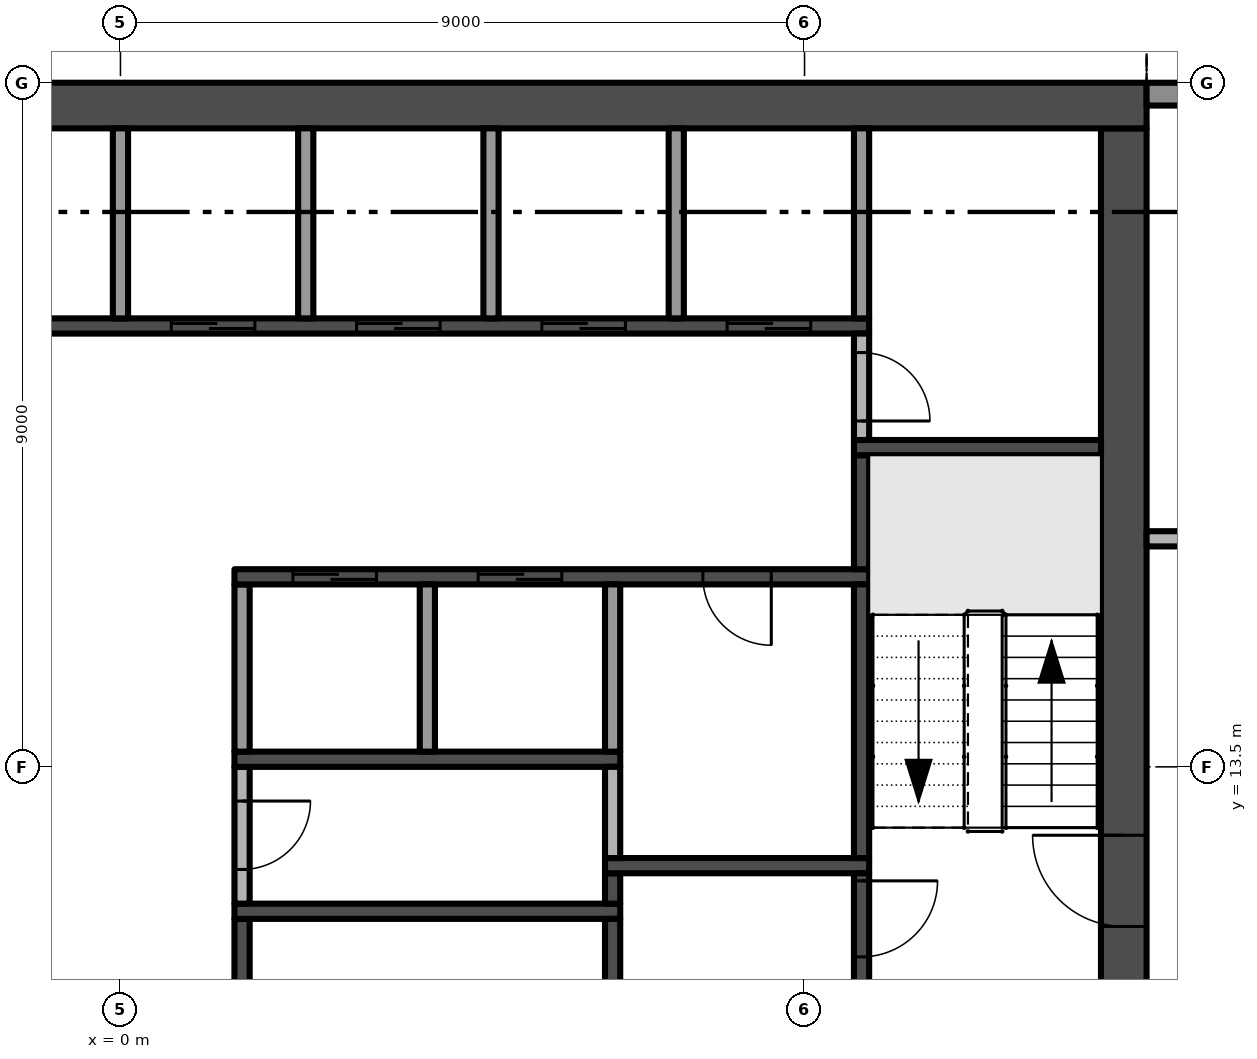
"""IFC4 building model, lengths in metres.
Left out: names, types, materials, properties, quantities, classifications, styles, units other than length and angle.
Written with IfcOpenShell. Run it as: python <this file> out.ifc"""

import sys

from ifc_helpers import new_model, si_unit, direction, frame, frame_2d, origin, place, context, subcontext, project, spatial, polyline, rectangle, outline, extrude, element, fill, save


model = new_model("IFC4")
c1 = context("Model", 3, precision=1e-05, world=origin(), true_north=direction((0.0, 1.0)))
c2 = subcontext(c1, "Body", "Model", "MODEL_VIEW")
j1 = project(units=[si_unit("LENGTHUNIT", "METRE"), si_unit("PLANEANGLEUNIT", "RADIAN")], contexts=[c1])
p1 = place(None, origin())
s1 = spatial("IfcSite", under=j1, at=p1, CompositionType="ELEMENT")
p2 = place(p1, origin())
s2 = spatial("IfcBuilding", under=s1, at=p2, CompositionType="ELEMENT")
p3 = place(p2, frame((0.0, 0.0, 195.8)))
s3 = spatial("IfcBuildingStorey", under=s2, at=p3, CompositionType="ELEMENT", Elevation=195.8)
p4 = place(p3, frame((13.2, 5.1, -0.3), z_axis=(0.0, 0.0, 1.0), x_axis=(0.0, 1.0, 0.0)))
e1 = element("IfcWall", 1, at=p4, inside=s3, PredefinedType="SHEAR", context=c2, shape_type="SweptSolid", body=[
    extrude(rectangle(XDim=16.8, YDim=0.6, at=frame_2d((8.4, 0.0))), origin(), (0.0, 0.0, 1.0), 3.8),
])
p5 = place(p4, frame((6.3, 0.0, 0.3)))
e2 = element("IfcOpeningElement", 2, at=p5, cuts=e1, PredefinedType="OPENING", context=c2, shape_type="SweptSolid", body=[
    extrude(rectangle(XDim=1.2, YDim=2.2, at=frame_2d((0.6, 1.1))), frame((0.0, 0.31, 0.0), z_axis=(0.0, -1.0, 0.0), x_axis=(1.0, 0.0, 0.0)), (0.0, 0.0, 1.0), 0.62),
])
p6 = place(p3, frame((13.5, 22.2, -0.3), z_axis=(0.0, 0.0, 1.0), x_axis=(-1.0, 0.0, 0.0)))
e3 = element("IfcWall", 3, at=p6, inside=s3, PredefinedType="SHEAR", context=c2, shape_type="SweptSolid", body=[
    extrude(rectangle(XDim=27.0, YDim=0.6, at=frame_2d((13.5, 0.0))), origin(), (0.0, 0.0, 1.0), 3.8),
])
p7 = place(p3, frame((13.5, 22.35, 0.0), z_axis=(0.0, 0.0, 1.0), x_axis=(1.0, 0.0, 0.0)))
e4 = element("IfcWall", 4, at=p7, inside=s3, PredefinedType="SOLIDWALL", context=c2, shape_type="SweptSolid", body=[
    extrude(rectangle(XDim=3.975, YDim=0.3, at=frame_2d((1.988, 0.0))), origin(), (0.0, 0.0, 1.0), 3.5),
])
p8 = place(p7, frame((0.625, 0.0, 0.0)))
e5 = element("IfcOpeningElement", 5, at=p8, cuts=e4, PredefinedType="OPENING", context=c2, shape_type="SweptSolid", body=[
    extrude(rectangle(XDim=2.4, YDim=2.4, at=frame_2d((1.2, 1.2))), frame((0.0, 0.16, 0.0), z_axis=(0.0, -1.0, 0.0), x_axis=(1.0, 0.0, 0.0)), (0.0, 0.0, 1.0), 0.32),
])
p9 = place(p3, origin())
e6 = element("IfcWall", 6, at=p9, inside=s3, PredefinedType="USERDEFINED", context=c2, shape_type="SweptSolid", body=[
    extrude(outline(polyline([(22.5, 24.3), (21.0, 23.595), (19.5, 23.159), (18.75, 23.1), (18.0, 23.159), (16.5, 23.595), (15.0, 24.3), (13.5, 25.005), (13.394, 24.779), (14.894, 24.074), (16.411, 23.36), (17.955, 22.911), (18.75, 22.849), (19.545, 22.911), (21.089, 23.36), (22.606, 24.074), (22.5, 24.3)])), origin(), (0.0, 0.0, 1.0), 0.9),
])
p10 = place(p3, frame((-9.85, 19.3, 0.0), z_axis=(0.0, 0.0, 1.0), x_axis=(1.0, 0.0, 0.0)))
e7 = element("IfcWall", 7, at=p10, inside=s3, PredefinedType="SHEAR", context=c2, shape_type="SweptSolid", body=[
    extrude(rectangle(XDim=19.7, YDim=0.2, at=frame_2d((9.85, 0.0))), origin(), (0.0, 0.0, 1.0), 3.5),
])
p11 = place(p10, frame((10.519, 0.0, 0.0)))
e8 = element("IfcOpeningElement", 8, at=p11, cuts=e7, PredefinedType="OPENING", context=c2, shape_type="SweptSolid", body=[
    extrude(rectangle(XDim=1.1, YDim=2.1, at=frame_2d((0.55, 1.05))), frame((0.0, 0.11, 0.0), z_axis=(0.0, -1.0, 0.0), x_axis=(1.0, 0.0, 0.0)), (0.0, 0.0, 1.0), 0.22),
])
p12 = place(p10, frame((12.956, 0.0, 0.0)))
e9 = element("IfcOpeningElement", 9, at=p12, cuts=e7, PredefinedType="OPENING", context=c2, shape_type="SweptSolid", body=[
    extrude(rectangle(XDim=1.1, YDim=2.1, at=frame_2d((0.55, 1.05))), frame((0.0, 0.11, 0.0), z_axis=(0.0, -1.0, 0.0), x_axis=(1.0, 0.0, 0.0)), (0.0, 0.0, 1.0), 0.22),
])
p13 = place(p10, frame((15.394, 0.0, 0.0)))
e10 = element("IfcOpeningElement", 10, at=p13, cuts=e7, PredefinedType="OPENING", context=c2, shape_type="SweptSolid", body=[
    extrude(rectangle(XDim=1.1, YDim=2.1, at=frame_2d((0.55, 1.05))), frame((0.0, 0.11, 0.0), z_axis=(0.0, -1.0, 0.0), x_axis=(1.0, 0.0, 0.0)), (0.0, 0.0, 1.0), 0.22),
])
p14 = place(p10, frame((17.831, 0.0, 0.0)))
e11 = element("IfcOpeningElement", 11, at=p14, cuts=e7, PredefinedType="OPENING", context=c2, shape_type="SweptSolid", body=[
    extrude(rectangle(XDim=1.1, YDim=2.1, at=frame_2d((0.55, 1.05))), frame((0.0, 0.11, 0.0), z_axis=(0.0, -1.0, 0.0), x_axis=(1.0, 0.0, 0.0)), (0.0, 0.0, 1.0), 0.22),
])
p15 = place(p10, frame((2.087, 0.0, 0.0)))
e12 = element("IfcOpeningElement", 12, at=p15, cuts=e7, PredefinedType="OPENING", context=c2, shape_type="SweptSolid", body=[
    extrude(rectangle(XDim=0.9, YDim=2.1, at=frame_2d((0.45, 1.05))), frame((0.0, 0.11, 0.0), z_axis=(0.0, -1.0, 0.0), x_axis=(1.0, 0.0, 0.0)), (0.0, 0.0, 1.0), 0.22),
])
p16 = place(p10, frame((6.963, 0.0, 0.0)))
e13 = element("IfcOpeningElement", 13, at=p16, cuts=e7, PredefinedType="OPENING", context=c2, shape_type="SweptSolid", body=[
    extrude(rectangle(XDim=0.9, YDim=2.1, at=frame_2d((0.45, 1.05))), frame((0.0, 0.11, 0.0), z_axis=(0.0, -1.0, 0.0), x_axis=(1.0, 0.0, 0.0)), (0.0, 0.0, 1.0), 0.22),
])
p17 = place(p3, frame((0.0, 19.4, 0.0), z_axis=(0.0, 0.0, 1.0), x_axis=(0.0, 1.0, 0.0)))
e14 = element("IfcWall", 14, at=p17, inside=s3, PredefinedType="PARTITIONING", context=c2, shape_type="SweptSolid", body=[
    extrude(rectangle(XDim=2.5, YDim=0.2, at=frame_2d((1.25, 0.0))), origin(), (0.0, 0.0, 1.0), 3.5),
])
p18 = place(p3, frame((1.6, 11.5, 0.0), z_axis=(0.0, 0.0, 1.0), x_axis=(0.0, -1.0, 0.0)))
e15 = element("IfcWall", 15, at=p18, inside=s3, PredefinedType="SHEAR", context=c2, shape_type="SweptSolid", body=[
    extrude(rectangle(XDim=6.4, YDim=0.2, at=frame_2d((3.2, 0.0))), origin(), (0.0, 0.0, 1.0), 3.5),
])
p19 = place(p18, frame((2.35, 0.0, 0.0)))
e16 = element("IfcOpeningElement", 16, at=p19, cuts=e15, PredefinedType="OPENING", context=c2, shape_type="SweptSolid", body=[
    extrude(rectangle(XDim=0.9, YDim=2.1, at=frame_2d((0.45, 1.05))), frame((0.0, 0.11, 0.0), z_axis=(0.0, -1.0, 0.0), x_axis=(1.0, 0.0, 0.0)), (0.0, 0.0, 1.0), 0.22),
])
p20 = place(p3, frame((1.5, 11.6, 0.0), z_axis=(0.0, 0.0, 1.0), x_axis=(1.0, 0.0, 0.0)))
e17 = element("IfcWall", 17, at=p20, inside=s3, PredefinedType="SHEAR", context=c2, shape_type="SweptSolid", body=[
    extrude(rectangle(XDim=5.075, YDim=0.2, at=frame_2d((2.538, 0.0))), origin(), (0.0, 0.0, 1.0), 3.5),
])
p21 = place(p3, frame((1.6, 13.5, 0.0), z_axis=(0.0, 0.0, 1.0), x_axis=(0.0, -1.0, 0.0)))
e18 = element("IfcWall", 18, at=p21, inside=s3, PredefinedType="PARTITIONING", context=c2, shape_type="SweptSolid", body=[
    extrude(rectangle(XDim=1.8, YDim=0.2, at=frame_2d((0.9, 0.0))), origin(), (0.0, 0.0, 1.0), 3.5),
])
p22 = place(p21, frame((0.45, 0.0, 0.0)))
e19 = element("IfcOpeningElement", 19, at=p22, cuts=e18, PredefinedType="OPENING", context=c2, shape_type="SweptSolid", body=[
    extrude(rectangle(XDim=0.9, YDim=2.1, at=frame_2d((0.45, 1.05))), frame((0.0, 0.11, 0.0), z_axis=(0.0, -1.0, 0.0), x_axis=(1.0, 0.0, 0.0)), (0.0, 0.0, 1.0), 0.22),
])
p23 = place(p3, frame((1.5, 13.6, 0.0), z_axis=(0.0, 0.0, 1.0), x_axis=(1.0, 0.0, 0.0)))
e20 = element("IfcWall", 20, at=p23, inside=s3, PredefinedType="SHEAR", context=c2, shape_type="SweptSolid", body=[
    extrude(rectangle(XDim=5.075, YDim=0.2, at=frame_2d((2.538, 0.0))), origin(), (0.0, 0.0, 1.0), 3.5),
])
p24 = place(p3, frame((1.6, 13.7, 0.0), z_axis=(0.0, 0.0, 1.0), x_axis=(0.0, 1.0, 0.0)))
e21 = element("IfcWall", 21, at=p24, inside=s3, PredefinedType="PARTITIONING", context=c2, shape_type="SweptSolid", body=[
    extrude(rectangle(XDim=2.2, YDim=0.2, at=frame_2d((1.1, 0.0))), origin(), (0.0, 0.0, 1.0), 3.5),
])
p25 = place(p3, frame((9.85, 16.0, 0.0), z_axis=(0.0, 0.0, 1.0), x_axis=(-1.0, 0.0, 0.0)))
e22 = element("IfcWall", 22, at=p25, inside=s3, PredefinedType="SHEAR", context=c2, shape_type="SweptSolid", body=[
    extrude(rectangle(XDim=8.35, YDim=0.2, at=frame_2d((4.175, 0.0))), origin(), (0.0, 0.0, 1.0), 3.5),
])
p26 = place(p25, frame((6.481, 0.0, 0.0)))
e23 = element("IfcOpeningElement", 23, at=p26, cuts=e22, PredefinedType="OPENING", context=c2, shape_type="SweptSolid", body=[
    extrude(rectangle(XDim=1.1, YDim=2.1, at=frame_2d((0.55, 1.05))), frame((0.0, 0.11, 0.0), z_axis=(0.0, -1.0, 0.0), x_axis=(1.0, 0.0, 0.0)), (0.0, 0.0, 1.0), 0.22),
])
p27 = place(p25, frame((4.044, 0.0, 0.0)))
e24 = element("IfcOpeningElement", 24, at=p27, cuts=e22, PredefinedType="OPENING", context=c2, shape_type="SweptSolid", body=[
    extrude(rectangle(XDim=1.1, YDim=2.1, at=frame_2d((0.55, 1.05))), frame((0.0, 0.11, 0.0), z_axis=(0.0, -1.0, 0.0), x_axis=(1.0, 0.0, 0.0)), (0.0, 0.0, 1.0), 0.22),
])
p28 = place(p25, frame((1.288, 0.0, 0.0)))
e25 = element("IfcOpeningElement", 25, at=p28, cuts=e22, PredefinedType="OPENING", context=c2, shape_type="SweptSolid", body=[
    extrude(rectangle(XDim=0.9, YDim=2.1, at=frame_2d((0.45, 1.05))), frame((0.0, 0.11, 0.0), z_axis=(0.0, -1.0, 0.0), x_axis=(1.0, 0.0, 0.0)), (0.0, 0.0, 1.0), 0.22),
])
p29 = place(p3, frame((2.438, 19.4, 0.0), z_axis=(0.0, 0.0, 1.0), x_axis=(0.0, 1.0, 0.0)))
e26 = element("IfcWall", 26, at=p29, inside=s3, PredefinedType="PARTITIONING", context=c2, shape_type="SweptSolid", body=[
    extrude(rectangle(XDim=2.5, YDim=0.2, at=frame_2d((1.25, 0.0))), origin(), (0.0, 0.0, 1.0), 3.5),
])
p30 = place(p3, frame((4.037, 13.7, 0.0), z_axis=(0.0, 0.0, 1.0), x_axis=(0.0, 1.0, 0.0)))
e27 = element("IfcWall", 27, at=p30, inside=s3, PredefinedType="PARTITIONING", context=c2, shape_type="SweptSolid", body=[
    extrude(rectangle(XDim=2.2, YDim=0.2, at=frame_2d((1.1, 0.0))), origin(), (0.0, 0.0, 1.0), 3.5),
])
p31 = place(p3, frame((4.875, 19.4, 0.0), z_axis=(0.0, 0.0, 1.0), x_axis=(0.0, 1.0, 0.0)))
e28 = element("IfcWall", 28, at=p31, inside=s3, PredefinedType="PARTITIONING", context=c2, shape_type="SweptSolid", body=[
    extrude(rectangle(XDim=2.5, YDim=0.2, at=frame_2d((1.25, 0.0))), origin(), (0.0, 0.0, 1.0), 3.5),
])
p32 = place(p3, frame((6.475, 5.1, 0.0), z_axis=(0.0, 0.0, 1.0), x_axis=(0.0, 1.0, 0.0)))
e29 = element("IfcWall", 29, at=p32, inside=s3, PredefinedType="SHEAR", context=c2, shape_type="SweptSolid", body=[
    extrude(rectangle(XDim=6.4, YDim=0.2, at=frame_2d((3.2, 0.0))), origin(), (0.0, 0.0, 1.0), 3.5),
])
p33 = place(p3, frame((6.475, 11.7, 0.0), z_axis=(0.0, 0.0, 1.0), x_axis=(0.0, 1.0, 0.0)))
e30 = element("IfcWall", 30, at=p33, inside=s3, PredefinedType="SHEAR", context=c2, shape_type="SweptSolid", body=[
    extrude(rectangle(XDim=0.4, YDim=0.2, at=frame_2d((0.2, 0.0))), origin(), (0.0, 0.0, 1.0), 3.5),
])
p34 = place(p3, frame((6.375, 12.2, 0.0), z_axis=(0.0, 0.0, 1.0), x_axis=(1.0, 0.0, 0.0)))
e31 = element("IfcWall", 31, at=p34, inside=s3, PredefinedType="SHEAR", context=c2, shape_type="SweptSolid", body=[
    extrude(rectangle(XDim=3.475, YDim=0.2, at=frame_2d((1.738, 0.0))), origin(), (0.0, 0.0, 1.0), 3.5),
])
p35 = place(p3, frame((6.475, 12.3, 0.0), z_axis=(0.0, 0.0, 1.0), x_axis=(0.0, 1.0, 0.0)))
e32 = element("IfcWall", 32, at=p35, inside=s3, PredefinedType="PARTITIONING", context=c2, shape_type="SweptSolid", body=[
    extrude(rectangle(XDim=1.2, YDim=0.2, at=frame_2d((0.6, 0.0))), origin(), (0.0, 0.0, 1.0), 3.5),
])
p36 = place(p3, frame((6.475, 13.7, 0.0), z_axis=(0.0, 0.0, 1.0), x_axis=(0.0, 1.0, 0.0)))
e33 = element("IfcWall", 33, at=p36, inside=s3, PredefinedType="PARTITIONING", context=c2, shape_type="SweptSolid", body=[
    extrude(rectangle(XDim=2.2, YDim=0.2, at=frame_2d((1.1, 0.0))), origin(), (0.0, 0.0, 1.0), 3.5),
])
p37 = place(p3, frame((7.312, 19.4, 0.0), z_axis=(0.0, 0.0, 1.0), x_axis=(0.0, 1.0, 0.0)))
e34 = element("IfcWall", 34, at=p37, inside=s3, PredefinedType="PARTITIONING", context=c2, shape_type="SweptSolid", body=[
    extrude(rectangle(XDim=2.5, YDim=0.2, at=frame_2d((1.25, 0.0))), origin(), (0.0, 0.0, 1.0), 3.5),
])
p38 = place(p3, frame((9.75, 12.1, 0.0), z_axis=(0.0, 0.0, 1.0), x_axis=(0.0, -1.0, 0.0)))
e35 = element("IfcWall", 35, at=p38, inside=s3, PredefinedType="SHEAR", context=c2, shape_type="SweptSolid", body=[
    extrude(rectangle(XDim=1.9, YDim=0.2, at=frame_2d((0.95, 0.0))), origin(), (0.0, 0.0, 1.0), 3.5),
])
p39 = place(p38, frame((0.1, 0.0, 0.0)))
e36 = element("IfcOpeningElement", 36, at=p39, cuts=e35, PredefinedType="OPENING", context=c2, shape_type="SweptSolid", body=[
    extrude(rectangle(XDim=1.0, YDim=2.2, at=frame_2d((0.5, 1.1))), frame((0.0, 0.11, 0.0), z_axis=(0.0, -1.0, 0.0), x_axis=(1.0, 0.0, 0.0)), (0.0, 0.0, 1.0), 0.22),
])
p40 = place(p3, frame((9.75, 12.3, 0.0), z_axis=(0.0, 0.0, 1.0), x_axis=(0.0, 1.0, 0.0)))
e37 = element("IfcWall", 37, at=p40, inside=s3, PredefinedType="SHEAR", context=c2, shape_type="SweptSolid", body=[
    extrude(rectangle(XDim=3.6, YDim=0.2, at=frame_2d((1.8, 0.0))), origin(), (0.0, 0.0, 1.0), 3.5),
])
p41 = place(p3, frame((9.75, 16.1, 0.0), z_axis=(0.0, 0.0, 1.0), x_axis=(0.0, 1.0, 0.0)))
e38 = element("IfcWall", 38, at=p41, inside=s3, PredefinedType="SHEAR", context=c2, shape_type="SweptSolid", body=[
    extrude(rectangle(XDim=1.5, YDim=0.2, at=frame_2d((0.75, 0.0))), origin(), (0.0, 0.0, 1.0), 3.5),
])
p42 = place(p3, frame((9.65, 17.7, 0.0), z_axis=(0.0, 0.0, 1.0), x_axis=(1.0, 0.0, 0.0)))
e39 = element("IfcWall", 39, at=p42, inside=s3, PredefinedType="SHEAR", context=c2, shape_type="SweptSolid", body=[
    extrude(rectangle(XDim=3.25, YDim=0.2, at=frame_2d((1.625, 0.0))), origin(), (0.0, 0.0, 1.0), 3.5),
])
p43 = place(p3, frame((9.75, 19.2, 0.0), z_axis=(0.0, 0.0, 1.0), x_axis=(0.0, -1.0, 0.0)))
e40 = element("IfcWall", 40, at=p43, inside=s3, PredefinedType="PARTITIONING", context=c2, shape_type="SweptSolid", body=[
    extrude(rectangle(XDim=1.4, YDim=0.2, at=frame_2d((0.7, 0.0))), origin(), (0.0, 0.0, 1.0), 3.5),
])
p44 = place(p43, frame((0.25, 0.0, 0.0)))
e41 = element("IfcOpeningElement", 41, at=p44, cuts=e40, PredefinedType="OPENING", context=c2, shape_type="SweptSolid", body=[
    extrude(rectangle(XDim=0.9, YDim=2.1, at=frame_2d((0.45, 1.05))), frame((0.0, 0.11, 0.0), z_axis=(0.0, -1.0, 0.0), x_axis=(1.0, 0.0, 0.0)), (0.0, 0.0, 1.0), 0.22),
])
p45 = place(p3, frame((9.75, 19.4, 0.0), z_axis=(0.0, 0.0, 1.0), x_axis=(0.0, 1.0, 0.0)))
e42 = element("IfcWall", 42, at=p45, inside=s3, PredefinedType="PARTITIONING", context=c2, shape_type="SweptSolid", body=[
    extrude(rectangle(XDim=2.5, YDim=0.2, at=frame_2d((1.25, 0.0))), origin(), (0.0, 0.0, 1.0), 3.5),
])
p46 = place(p3, frame((13.5, 16.5, 0.0), z_axis=(0.0, 0.0, 1.0), x_axis=(1.0, 0.0, 0.0)))
e43 = element("IfcWall", 43, at=p46, inside=s3, PredefinedType="PARTITIONING", context=c2, shape_type="SweptSolid", body=[
    extrude(rectangle(XDim=3.825, YDim=0.2, at=frame_2d((1.913, 0.0))), origin(), (0.0, 0.0, 1.0), 3.5),
])
p47 = place(p46, frame((1.55, 0.0, 0.0)))
e44 = element("IfcOpeningElement", 44, at=p47, cuts=e43, PredefinedType="OPENING", context=c2, shape_type="SweptSolid", body=[
    extrude(rectangle(XDim=0.9, YDim=2.1, at=frame_2d((0.45, 1.05))), frame((0.0, 0.11, 0.0), z_axis=(0.0, -1.0, 0.0), x_axis=(1.0, 0.0, 0.0)), (0.0, 0.0, 1.0), 0.22),
])
p48 = place(p5, frame((1.2, 0.0, 0.0), z_axis=(0.0, 0.0, 1.0), x_axis=(-1.0, 0.0, 0.0)))
e45 = element("IfcDoor", 45, at=p48, inside=s3, OperationType="SINGLE_SWING_LEFT", PredefinedType="DOOR", context=c2, shape_type="SweptSolid", body=[
    extrude(rectangle(XDim=1.2, YDim=2.2, at=frame_2d((0.6, 1.1))), frame((0.0, 0.025, 0.0), z_axis=(0.0, -1.0, 0.0), x_axis=(1.0, 0.0, 0.0)), (0.0, 0.0, 1.0), 0.05),
])
fill(e2, e45)
p49 = place(p39, origin())
e46 = element("IfcDoor", 46, at=p49, inside=s3, OperationType="SINGLE_SWING_LEFT", PredefinedType="DOOR", context=c2, shape_type="SweptSolid", body=[
    extrude(rectangle(XDim=1.0, YDim=2.2, at=frame_2d((0.5, 1.1))), frame((0.0, 0.025, 0.0), z_axis=(0.0, -1.0, 0.0), x_axis=(1.0, 0.0, 0.0)), (0.0, 0.0, 1.0), 0.05),
])
fill(e36, e46)
p50 = place(p11, origin())
e47 = element("IfcDoor", 47, at=p50, inside=s3, OperationType="SLIDING_TO_RIGHT", PredefinedType="DOOR", context=c2, shape_type="SweptSolid", body=[
    extrude(rectangle(XDim=1.1, YDim=2.1, at=frame_2d((0.55, 1.05))), frame((0.0, 0.025, 0.0), z_axis=(0.0, -1.0, 0.0), x_axis=(1.0, 0.0, 0.0)), (0.0, 0.0, 1.0), 0.05),
])
fill(e8, e47)
p51 = place(p12, origin())
e48 = element("IfcDoor", 48, at=p51, inside=s3, OperationType="SLIDING_TO_RIGHT", PredefinedType="DOOR", context=c2, shape_type="SweptSolid", body=[
    extrude(rectangle(XDim=1.1, YDim=2.1, at=frame_2d((0.55, 1.05))), frame((0.0, 0.025, 0.0), z_axis=(0.0, -1.0, 0.0), x_axis=(1.0, 0.0, 0.0)), (0.0, 0.0, 1.0), 0.05),
])
fill(e9, e48)
p52 = place(p13, origin())
e49 = element("IfcDoor", 49, at=p52, inside=s3, OperationType="SLIDING_TO_RIGHT", PredefinedType="DOOR", context=c2, shape_type="SweptSolid", body=[
    extrude(rectangle(XDim=1.1, YDim=2.1, at=frame_2d((0.55, 1.05))), frame((0.0, 0.025, 0.0), z_axis=(0.0, -1.0, 0.0), x_axis=(1.0, 0.0, 0.0)), (0.0, 0.0, 1.0), 0.05),
])
fill(e10, e49)
p53 = place(p14, origin())
e50 = element("IfcDoor", 50, at=p53, inside=s3, OperationType="SLIDING_TO_RIGHT", PredefinedType="DOOR", context=c2, shape_type="SweptSolid", body=[
    extrude(rectangle(XDim=1.1, YDim=2.1, at=frame_2d((0.55, 1.05))), frame((0.0, 0.025, 0.0), z_axis=(0.0, -1.0, 0.0), x_axis=(1.0, 0.0, 0.0)), (0.0, 0.0, 1.0), 0.05),
])
fill(e11, e50)
p54 = place(p26, origin())
e51 = element("IfcDoor", 51, at=p54, inside=s3, OperationType="SLIDING_TO_RIGHT", PredefinedType="DOOR", context=c2, shape_type="SweptSolid", body=[
    extrude(rectangle(XDim=1.1, YDim=2.1, at=frame_2d((0.55, 1.05))), frame((0.0, 0.025, 0.0), z_axis=(0.0, -1.0, 0.0), x_axis=(1.0, 0.0, 0.0)), (0.0, 0.0, 1.0), 0.05),
])
fill(e23, e51)
p55 = place(p27, origin())
e52 = element("IfcDoor", 52, at=p55, inside=s3, OperationType="SLIDING_TO_RIGHT", PredefinedType="DOOR", context=c2, shape_type="SweptSolid", body=[
    extrude(rectangle(XDim=1.1, YDim=2.1, at=frame_2d((0.55, 1.05))), frame((0.0, 0.025, 0.0), z_axis=(0.0, -1.0, 0.0), x_axis=(1.0, 0.0, 0.0)), (0.0, 0.0, 1.0), 0.05),
])
fill(e24, e52)
p56 = place(p22, origin())
e53 = element("IfcDoor", 53, at=p56, inside=s3, OperationType="SINGLE_SWING_LEFT", PredefinedType="DOOR", context=c2, shape_type="SweptSolid", body=[
    extrude(rectangle(XDim=0.9, YDim=2.1, at=frame_2d((0.45, 1.05))), frame((0.0, 0.025, 0.0), z_axis=(0.0, -1.0, 0.0), x_axis=(1.0, 0.0, 0.0)), (0.0, 0.0, 1.0), 0.05),
])
fill(e19, e53)
p57 = place(p28, origin())
e54 = element("IfcDoor", 54, at=p57, inside=s3, OperationType="SINGLE_SWING_LEFT", PredefinedType="DOOR", context=c2, shape_type="SweptSolid", body=[
    extrude(rectangle(XDim=0.9, YDim=2.1, at=frame_2d((0.45, 1.05))), frame((0.0, 0.025, 0.0), z_axis=(0.0, -1.0, 0.0), x_axis=(1.0, 0.0, 0.0)), (0.0, 0.0, 1.0), 0.05),
])
fill(e25, e54)
p58 = place(p44, origin())
e55 = element("IfcDoor", 55, at=p58, inside=s3, OperationType="SINGLE_SWING_RIGHT", PredefinedType="DOOR", context=c2, shape_type="SweptSolid", body=[
    extrude(rectangle(XDim=0.9, YDim=2.1, at=frame_2d((0.45, 1.05))), frame((0.0, 0.025, 0.0), z_axis=(0.0, -1.0, 0.0), x_axis=(1.0, 0.0, 0.0)), (0.0, 0.0, 1.0), 0.05),
])
fill(e41, e55)
save(model, sys.argv[1])
